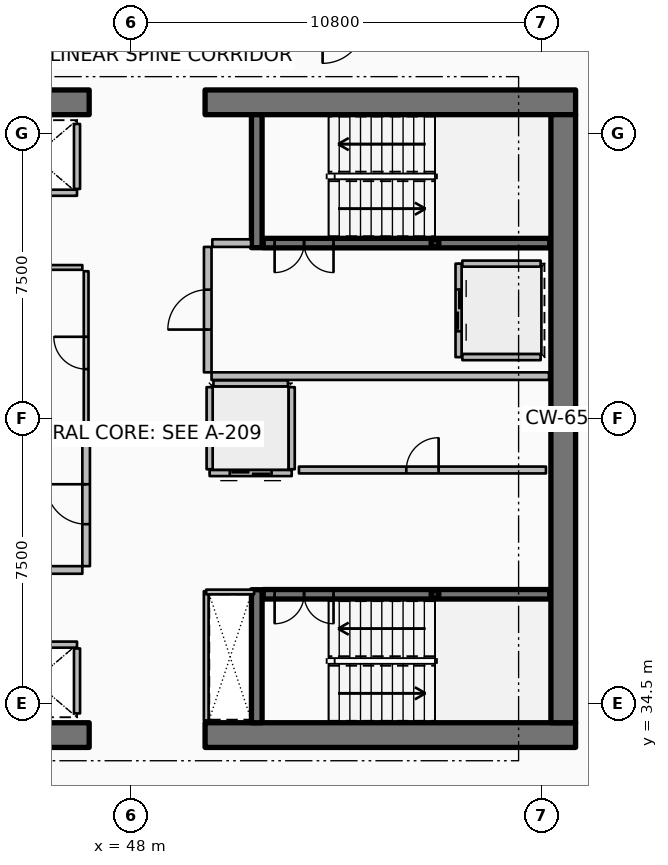
"""IFC4 building model, lengths in metres.
Left out: names, types, materials, properties, quantities, classifications, styles, units other than length and angle.
Written with IfcOpenShell. Run it as: python <this file> out.ifc"""

import sys

from ifc_helpers import new_model, si_unit, direction, frame, frame_2d, origin, origin_2d, place, context, subcontext, project, spatial, rectangle, hollow_rectangle, extrude, element, fill, save


model = new_model("IFC4")
c1 = context("Model", 3, precision=1e-05, world=origin(), true_north=direction((0.0, 1.0)))
c2 = subcontext(c1, "Body", "Model", "MODEL_VIEW")
j1 = project(units=[si_unit("LENGTHUNIT", "METRE"), si_unit("PLANEANGLEUNIT", "RADIAN")], contexts=[c1])
p1 = place(None, origin())
s1 = spatial("IfcSite", under=j1, at=p1, CompositionType="ELEMENT")
p2 = place(p1, origin())
s2 = spatial("IfcBuilding", under=s1, at=p2, CompositionType="ELEMENT")
p3 = place(p2, frame((0.0, 0.0, 195.3)))
s3 = spatial("IfcBuildingStorey", under=s2, at=p3, CompositionType="ELEMENT", Elevation=195.3)
for number, where, z_axis, x_axis in (
    (1, (37.15, 33.675, 0.0), (0.0, 0.0, 1.0), (1.0, 0.0, 0.0)),
    (2, (49.95, 33.675, 0.0), (0.0, 0.0, 1.0), (1.0, 0.0, 0.0)),
    (3, (37.15, 50.325, 0.0), (0.0, 0.0, 1.0), (1.0, 0.0, 0.0)),
    (4, (49.95, 50.325, 0.0), (0.0, 0.0, 1.0), (1.0, 0.0, 0.0)),
):
    element("IfcWall", number, at=place(p3, frame(where, z_axis=z_axis, x_axis=x_axis)), inside=s3, PredefinedType="SHEAR", context=c2, shape_type="SweptSolid", body=[
        extrude(rectangle(XDim=9.75, YDim=0.65, at=frame_2d((4.875, 0.0))), origin(), (0.0, 0.0, 1.0), 3.75),
    ])
p4 = place(p3, frame((59.375, 34.0, 0.0), z_axis=(0.0, 0.0, 1.0), x_axis=(0.0, 1.0, 0.0)))
e5 = element("IfcWall", 5, at=p4, inside=s3, PredefinedType="SHEAR", context=c2, shape_type="SweptSolid", body=[
    extrude(rectangle(XDim=16.0, YDim=0.65, at=frame_2d((8.0, 0.0))), origin(), (0.0, 0.0, 1.0), 3.75),
])
for number, where, z_axis, x_axis in (
    (6, (51.31, 46.5, 0.0), (0.0, 0.0, 1.0), (0.0, 1.0, 0.0)),
    (7, (51.31, 34.0, 0.0), (0.0, 0.0, 1.0), (0.0, 1.0, 0.0)),
):
    element("IfcWall", number, at=place(p3, frame(where, z_axis=z_axis, x_axis=x_axis)), inside=s3, PredefinedType="SHEAR", context=c2, shape_type="SweptSolid", body=[
        extrude(rectangle(XDim=3.5, YDim=0.28, at=frame_2d((1.75, 0.0))), origin(), (0.0, 0.0, 1.0), 3.75),
    ])
for number, where, z_axis, x_axis in (
    (8, (56.0, 46.62, 0.0), (0.0, 0.0, 1.0), (1.0, 0.0, 0.0)),
    (9, (56.0, 37.38, 0.0), (0.0, 0.0, 1.0), (1.0, 0.0, 0.0)),
):
    element("IfcColumn", number, at=place(p3, frame(where, z_axis=z_axis, x_axis=x_axis)), inside=s3, PredefinedType="COLUMN", context=c2, shape_type="SweptSolid", body=[
        extrude(hollow_rectangle(XDim=0.2, YDim=0.2, WallThickness=0.01, InnerFilletRadius=0.01, OuterFilletRadius=0.02, at=origin_2d()), origin(), (0.0, 0.0, 1.0), 1.67),
    ])
p5 = place(p3, frame((51.48, 46.62, 0.0), z_axis=(0.0, 0.0, 1.0), x_axis=(1.0, 0.0, 0.0)))
e10 = element("IfcWall", 10, at=p5, inside=s3, PredefinedType="SOLIDWALL", context=c2, shape_type="SweptSolid", body=[
    extrude(rectangle(XDim=7.54, YDim=0.25, at=frame_2d((3.77, 0.0))), origin(), (0.0, 0.0, 1.0), 3.5),
])
p6 = place(p5, frame((0.3, 0.0, 0.0)))
e11 = element("IfcOpeningElement", 11, at=p6, cuts=e10, PredefinedType="OPENING", context=c2, shape_type="SweptSolid", body=[
    extrude(rectangle(XDim=1.55, YDim=2.15, at=frame_2d((0.775, 1.075))), frame((0.0, 0.135, 0.0), z_axis=(0.0, -1.0, 0.0), x_axis=(1.0, 0.0, 0.0)), (0.0, 0.0, 1.0), 0.27),
])
p7 = place(p3, frame((51.48, 37.38, 0.0), z_axis=(0.0, 0.0, 1.0), x_axis=(1.0, 0.0, 0.0)))
e12 = element("IfcWall", 12, at=p7, inside=s3, PredefinedType="SOLIDWALL", context=c2, shape_type="SweptSolid", body=[
    extrude(rectangle(XDim=7.54, YDim=0.25, at=frame_2d((3.77, 0.0))), origin(), (0.0, 0.0, 1.0), 3.5),
])
p8 = place(p7, frame((0.3, 0.0, 0.0)))
e13 = element("IfcOpeningElement", 13, at=p8, cuts=e12, PredefinedType="OPENING", context=c2, shape_type="SweptSolid", body=[
    extrude(rectangle(XDim=1.55, YDim=2.15, at=frame_2d((0.775, 1.075))), frame((0.0, 0.135, 0.0), z_axis=(0.0, -1.0, 0.0), x_axis=(1.0, 0.0, 0.0)), (0.0, 0.0, 1.0), 0.27),
])
p9 = place(p3, frame((46.58, 47.945, 0.0), z_axis=(0.0, 0.0, 1.0), x_axis=(-1.0, 0.0, 0.0)))
e14 = element("IfcWall", 14, at=p9, inside=s3, PredefinedType="PARTITIONING", context=c2, shape_type="SweptSolid", body=[
    extrude(rectangle(XDim=2.26, YDim=0.16, at=frame_2d((1.13, 0.0))), origin(), (0.0, 0.0, 1.0), 3.5),
])
p10 = place(p3, frame((46.58, 48.045, 0.0), z_axis=(0.0, 0.0, 1.0), x_axis=(0.0, 1.0, 0.0)))
e15 = element("IfcWall", 15, at=p10, inside=s3, PredefinedType="PARTITIONING", context=c2, shape_type="SweptSolid", body=[
    extrude(rectangle(XDim=1.71, YDim=0.16, at=frame_2d((0.855, 0.0))), origin(), (0.0, 0.0, 1.0), 3.5),
])
p11 = place(p3, frame((44.32, 36.055, 0.0), z_axis=(0.0, 0.0, 1.0), x_axis=(1.0, 0.0, 0.0)))
e16 = element("IfcWall", 16, at=p11, inside=s3, PredefinedType="PARTITIONING", context=c2, shape_type="SweptSolid", body=[
    extrude(rectangle(XDim=2.26, YDim=0.16, at=frame_2d((1.13, 0.0))), origin(), (0.0, 0.0, 1.0), 3.5),
])
p12 = place(p3, frame((46.58, 34.245, 0.0), z_axis=(0.0, 0.0, 1.0), x_axis=(0.0, 1.0, 0.0)))
e17 = element("IfcWall", 17, at=p12, inside=s3, PredefinedType="PARTITIONING", context=c2, shape_type="SweptSolid", body=[
    extrude(rectangle(XDim=1.71, YDim=0.16, at=frame_2d((0.855, 0.0))), origin(), (0.0, 0.0, 1.0), 3.5),
])
p13 = place(p3, frame((56.62, 46.08, 0.0), z_axis=(0.0, 0.0, 1.0), x_axis=(0.0, -1.0, 0.0)))
e18 = element("IfcWall", 18, at=p13, inside=s3, PredefinedType="PARTITIONING", context=c2, shape_type="SweptSolid", body=[
    extrude(rectangle(XDim=2.46, YDim=0.16, at=frame_2d((1.23, 0.0))), origin(), (0.0, 0.0, 1.0), 3.5),
])
p14 = place(p13, frame((0.68, 0.0, 0.0)))
e19 = element("IfcOpeningElement", 19, at=p14, cuts=e18, PredefinedType="OPENING", context=c2, shape_type="SweptSolid", body=[
    extrude(rectangle(XDim=1.1, YDim=2.1, at=frame_2d((0.55, 1.05))), frame((0.0, 0.09, 0.0), z_axis=(0.0, -1.0, 0.0), x_axis=(1.0, 0.0, 0.0)), (0.0, 0.0, 1.0), 0.18),
])
for number, where, z_axis, x_axis in (
    (20, (56.72, 46.08, 0.0), (0.0, 0.0, 1.0), (1.0, 0.0, 0.0)),
    (21, (56.72, 43.62, 0.0), (0.0, 0.0, 1.0), (1.0, 0.0, 0.0)),
):
    element("IfcWall", number, at=place(p3, frame(where, z_axis=z_axis, x_axis=x_axis)), inside=s3, PredefinedType="PARTITIONING", context=c2, shape_type="SweptSolid", body=[
        extrude(rectangle(XDim=2.06, YDim=0.16, at=frame_2d((1.03, 0.0))), origin(), (0.0, 0.0, 1.0), 3.5),
    ])
p15 = place(p3, frame((52.23, 40.57, 0.0), z_axis=(0.0, 0.0, 1.0), x_axis=(-1.0, 0.0, 0.0)))
e22 = element("IfcWall", 22, at=p15, inside=s3, PredefinedType="PARTITIONING", context=c2, shape_type="SweptSolid", body=[
    extrude(rectangle(XDim=2.16, YDim=0.16, at=frame_2d((1.08, 0.0))), origin(), (0.0, 0.0, 1.0), 3.5),
])
p16 = place(p15, frame((0.53, 0.0, 0.0)))
e23 = element("IfcOpeningElement", 23, at=p16, cuts=e22, PredefinedType="OPENING", context=c2, shape_type="SweptSolid", body=[
    extrude(rectangle(XDim=1.1, YDim=2.1, at=frame_2d((0.55, 1.05))), frame((0.0, 0.09, 0.0), z_axis=(0.0, -1.0, 0.0), x_axis=(1.0, 0.0, 0.0)), (0.0, 0.0, 1.0), 0.18),
])
for number, where, z_axis, x_axis in (
    (24, (52.23, 40.67, 0.0), (0.0, 0.0, 1.0), (0.0, 1.0, 0.0)),
    (25, (50.07, 40.67, 0.0), (0.0, 0.0, 1.0), (0.0, 1.0, 0.0)),
):
    element("IfcWall", number, at=place(p3, frame(where, z_axis=z_axis, x_axis=x_axis)), inside=s3, PredefinedType="PARTITIONING", context=c2, shape_type="SweptSolid", body=[
        extrude(rectangle(XDim=2.16, YDim=0.16, at=frame_2d((1.08, 0.0))), origin(), (0.0, 0.0, 1.0), 3.5),
    ])
p17 = place(p3, frame((50.17, 42.93, 0.0), z_axis=(0.0, 0.0, 1.0), x_axis=(1.0, 0.0, 0.0)))
e26 = element("IfcWall", 26, at=p17, inside=s3, PredefinedType="PARTITIONING", context=c2, shape_type="SweptSolid", body=[
    extrude(rectangle(XDim=1.96, YDim=0.16, at=frame_2d((0.98, 0.0))), origin(), (0.0, 0.0, 1.0), 3.5),
])
p18 = place(p3, frame((52.42, 40.65, 0.0), z_axis=(0.0, 0.0, 1.0), x_axis=(1.0, 0.0, 0.0)))
e27 = element("IfcWall", 27, at=p18, inside=s3, PredefinedType="PARTITIONING", context=c2, shape_type="SweptSolid", body=[
    extrude(rectangle(XDim=6.5, YDim=0.18, at=frame_2d((3.25, 0.0))), origin(), (0.0, 0.0, 1.0), 3.5),
])
p19 = place(p18, frame((2.825, 0.0, 0.0)))
e28 = element("IfcOpeningElement", 28, at=p19, cuts=e27, PredefinedType="OPENING", context=c2, shape_type="SweptSolid", body=[
    extrude(rectangle(XDim=0.85, YDim=2.06, at=frame_2d((0.425, 1.03))), frame((0.0, 0.1, 0.0), z_axis=(0.0, -1.0, 0.0), x_axis=(1.0, 0.0, 0.0)), (0.0, 0.0, 1.0), 0.2),
])
p20 = place(p3, frame((41.35, 38.02, 0.0), z_axis=(0.0, 0.0, 1.0), x_axis=(1.0, 0.0, 0.0)))
e29 = element("IfcWall", 29, at=p20, inside=s3, PredefinedType="PARTITIONING", context=c2, shape_type="SweptSolid", body=[
    extrude(rectangle(XDim=5.37, YDim=0.2, at=frame_2d((2.685, 0.0))), origin(), (0.0, 0.0, 1.0), 3.5),
])
p21 = place(p3, frame((43.92, 41.48, 0.0), z_axis=(0.0, 0.0, 1.0), x_axis=(1.0, 0.0, 0.0)))
e30 = element("IfcWall", 30, at=p21, inside=s3, PredefinedType="PARTITIONING", context=c2, shape_type="SweptSolid", body=[
    extrude(rectangle(XDim=2.8, YDim=0.2, at=frame_2d((1.4, 0.0))), origin(), (0.0, 0.0, 1.0), 3.5),
])
p22 = place(p3, frame((46.82, 38.12, 0.0), z_axis=(0.0, 0.0, 1.0), x_axis=(0.0, 1.0, 0.0)))
e31 = element("IfcWall", 31, at=p22, inside=s3, PredefinedType="PARTITIONING", context=c2, shape_type="SweptSolid", body=[
    extrude(rectangle(XDim=3.26, YDim=0.2, at=frame_2d((1.63, 0.0))), origin(), (0.0, 0.0, 1.0), 3.5),
])
p23 = place(p22, frame((1.105, 0.0, 0.0)))
e32 = element("IfcOpeningElement", 32, at=p23, cuts=e31, PredefinedType="OPENING", context=c2, shape_type="SweptSolid", body=[
    extrude(rectangle(XDim=1.05, YDim=2.1, at=frame_2d((0.525, 1.05))), frame((0.0, 0.11, 0.0), z_axis=(0.0, -1.0, 0.0), x_axis=(1.0, 0.0, 0.0)), (0.0, 0.0, 1.0), 0.22),
])
p24 = place(p3, frame((50.12, 43.12, 0.0), z_axis=(0.0, 0.0, 1.0), x_axis=(1.0, 0.0, 0.0)))
e33 = element("IfcWall", 33, at=p24, inside=s3, PredefinedType="PARTITIONING", context=c2, shape_type="SweptSolid", body=[
    extrude(rectangle(XDim=8.88, YDim=0.2, at=frame_2d((4.44, 0.0))), origin(), (0.0, 0.0, 1.0), 3.5),
])
p25 = place(p3, frame((50.14, 46.62, 0.0), z_axis=(0.0, 0.0, 1.0), x_axis=(1.0, 0.0, 0.0)))
e34 = element("IfcWall", 34, at=p25, inside=s3, PredefinedType="PARTITIONING", context=c2, shape_type="SweptSolid", body=[
    extrude(rectangle(XDim=1.02, YDim=0.2, at=frame_2d((0.51, 0.0))), origin(), (0.0, 0.0, 1.0), 3.5),
])
p26 = place(p3, frame((50.02, 43.22, 0.0), z_axis=(0.0, 0.0, 1.0), x_axis=(0.0, 1.0, 0.0)))
e35 = element("IfcWall", 35, at=p26, inside=s3, PredefinedType="PARTITIONING", context=c2, shape_type="SweptSolid", body=[
    extrude(rectangle(XDim=3.3, YDim=0.2, at=frame_2d((1.65, 0.0))), origin(), (0.0, 0.0, 1.0), 3.5),
])
p27 = place(p26, frame((1.125, 0.0, 0.0)))
e36 = element("IfcOpeningElement", 36, at=p27, cuts=e35, PredefinedType="OPENING", context=c2, shape_type="SweptSolid", body=[
    extrude(rectangle(XDim=1.05, YDim=2.1, at=frame_2d((0.525, 1.05))), frame((0.0, 0.11, 0.0), z_axis=(0.0, -1.0, 0.0), x_axis=(1.0, 0.0, 0.0)), (0.0, 0.0, 1.0), 0.22),
])
p28 = place(p3, frame((41.36, 45.98, 0.0), z_axis=(0.0, 0.0, 1.0), x_axis=(1.0, 0.0, 0.0)))
e37 = element("IfcWall", 37, at=p28, inside=s3, PredefinedType="PARTITIONING", context=c2, shape_type="SweptSolid", body=[
    extrude(rectangle(XDim=5.36, YDim=0.125, at=frame_2d((2.68, 0.0))), origin(), (0.0, 0.0, 1.0), 2.94),
])
p29 = place(p3, frame((49.98, 34.06, 0.0), z_axis=(0.0, 0.0, 1.0), x_axis=(0.0, 1.0, 0.0)))
e38 = element("IfcWall", 38, at=p29, inside=s3, PredefinedType="PARTITIONING", context=c2, shape_type="SweptSolid", body=[
    extrude(rectangle(XDim=3.4, YDim=0.125, at=frame_2d((1.7, 0.0))), origin(), (0.0, 0.0, 1.0), 2.94),
])
p30 = place(p3, frame((49.98, 37.44, 0.0), z_axis=(0.0, 0.0, 1.0), x_axis=(1.0, 0.0, 0.0)))
e39 = element("IfcWall", 39, at=p30, inside=s3, PredefinedType="PARTITIONING", context=c2, shape_type="SweptSolid", body=[
    extrude(rectangle(XDim=1.26, YDim=0.125, at=frame_2d((0.63, 0.0))), origin(), (0.0, 0.0, 1.0), 2.94),
])
p31 = place(p3, frame((46.82, 41.58, 0.0), z_axis=(0.0, 0.0, 1.0), x_axis=(0.0, 1.0, 0.0)))
e40 = element("IfcWall", 40, at=p31, inside=s3, PredefinedType="PARTITIONING", context=c2, shape_type="SweptSolid", body=[
    extrude(rectangle(XDim=4.3, YDim=0.125, at=frame_2d((2.15, 0.0))), origin(), (0.0, 0.0, 1.0), 2.94),
])
p32 = place(p31, frame((1.725, 0.0, 0.0)))
e41 = element("IfcOpeningElement", 41, at=p32, cuts=e40, PredefinedType="OPENING", context=c2, shape_type="SweptSolid", body=[
    extrude(rectangle(XDim=0.85, YDim=2.06, at=frame_2d((0.425, 1.03))), frame((0.0, 0.073, 0.0), z_axis=(0.0, -1.0, 0.0), x_axis=(1.0, 0.0, 0.0)), (0.0, 0.0, 1.0), 0.145),
])
p33 = place(p6, origin())
e42 = element("IfcDoor", 42, at=p33, inside=s3, OperationType="DOUBLE_DOOR_SINGLE_SWING", PredefinedType="DOOR", context=c2, shape_type="SweptSolid", body=[
    extrude(rectangle(XDim=1.55, YDim=2.15, at=frame_2d((0.775, 1.075))), frame((0.0, 0.025, 0.0), z_axis=(0.0, -1.0, 0.0), x_axis=(1.0, 0.0, 0.0)), (0.0, 0.0, 1.0), 0.05),
])
fill(e11, e42)
p34 = place(p8, origin())
e43 = element("IfcDoor", 43, at=p34, inside=s3, OperationType="DOUBLE_DOOR_SINGLE_SWING", PredefinedType="DOOR", context=c2, shape_type="SweptSolid", body=[
    extrude(rectangle(XDim=1.55, YDim=2.15, at=frame_2d((0.775, 1.075))), frame((0.0, 0.025, 0.0), z_axis=(0.0, -1.0, 0.0), x_axis=(1.0, 0.0, 0.0)), (0.0, 0.0, 1.0), 0.05),
])
fill(e13, e43)
p35 = place(p14, origin())
e44 = element("IfcDoor", 44, at=p35, inside=s3, OperationType="DOUBLE_DOOR_SLIDING", PredefinedType="DOOR", context=c2, shape_type="SweptSolid", body=[
    extrude(rectangle(XDim=1.1, YDim=2.1, at=frame_2d((0.55, 1.05))), frame((0.0, 0.025, 0.0), z_axis=(0.0, -1.0, 0.0), x_axis=(1.0, 0.0, 0.0)), (0.0, 0.0, 1.0), 0.05),
])
fill(e19, e44)
p36 = place(p16, origin())
e45 = element("IfcDoor", 45, at=p36, inside=s3, OperationType="DOUBLE_DOOR_SLIDING", PredefinedType="DOOR", context=c2, shape_type="SweptSolid", body=[
    extrude(rectangle(XDim=1.1, YDim=2.1, at=frame_2d((0.55, 1.05))), frame((0.0, 0.025, 0.0), z_axis=(0.0, -1.0, 0.0), x_axis=(1.0, 0.0, 0.0)), (0.0, 0.0, 1.0), 0.05),
])
fill(e23, e45)
p37 = place(p19, origin())
e46 = element("IfcDoor", 46, at=p37, inside=s3, OperationType="SINGLE_SWING_RIGHT", PredefinedType="DOOR", context=c2, shape_type="SweptSolid", body=[
    extrude(rectangle(XDim=0.85, YDim=2.06, at=frame_2d((0.425, 1.03))), frame((0.0, 0.025, 0.0), z_axis=(0.0, -1.0, 0.0), x_axis=(1.0, 0.0, 0.0)), (0.0, 0.0, 1.0), 0.05),
])
fill(e28, e46)
p38 = place(p23, origin())
e47 = element("IfcDoor", 47, at=p38, inside=s3, OperationType="SINGLE_SWING_RIGHT", PredefinedType="DOOR", context=c2, shape_type="SweptSolid", body=[
    extrude(rectangle(XDim=1.05, YDim=2.1, at=frame_2d((0.525, 1.05))), frame((0.0, 0.025, 0.0), z_axis=(0.0, -1.0, 0.0), x_axis=(1.0, 0.0, 0.0)), (0.0, 0.0, 1.0), 0.05),
])
fill(e32, e47)
p39 = place(p27, origin())
e48 = element("IfcDoor", 48, at=p39, inside=s3, OperationType="SINGLE_SWING_LEFT", PredefinedType="DOOR", context=c2, shape_type="SweptSolid", body=[
    extrude(rectangle(XDim=1.05, YDim=2.1, at=frame_2d((0.525, 1.05))), frame((0.0, 0.025, 0.0), z_axis=(0.0, -1.0, 0.0), x_axis=(1.0, 0.0, 0.0)), (0.0, 0.0, 1.0), 0.05),
])
fill(e36, e48)
p40 = place(p32, origin())
e49 = element("IfcDoor", 49, at=p40, inside=s3, OperationType="SINGLE_SWING_RIGHT", PredefinedType="DOOR", context=c2, shape_type="SweptSolid", body=[
    extrude(rectangle(XDim=0.85, YDim=2.06, at=frame_2d((0.425, 1.03))), frame((0.0, 0.025, 0.0), z_axis=(0.0, -1.0, 0.0), x_axis=(1.0, 0.0, 0.0)), (0.0, 0.0, 1.0), 0.05),
])
fill(e41, e49)
save(model, sys.argv[1])
